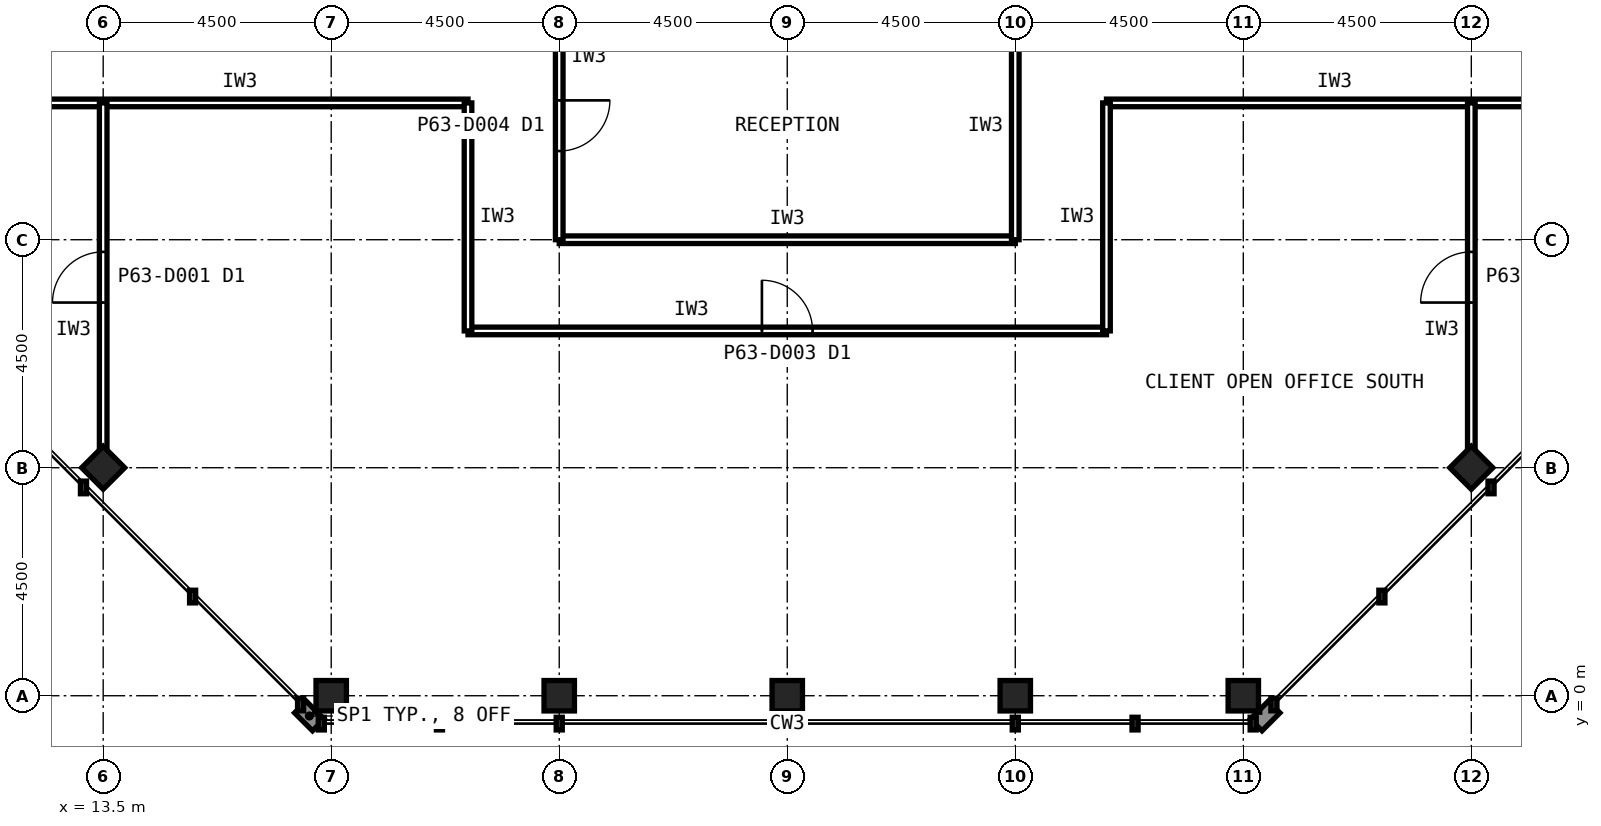
"""IFC4 building model, lengths in metres.
Left out: names, types, materials, properties, quantities, classifications, styles, units other than length and angle.
Written with IfcOpenShell. Run it as: python <this file> out.ifc"""

import sys

from ifc_helpers import new_model, si_unit, direction, frame, frame_2d, origin, origin_2d, place, context, subcontext, project, spatial, rectangle, hollow_rectangle, extrude, element, fill, save


model = new_model("IFC4")
c1 = context("Model", 3, precision=1e-05, world=origin(), true_north=direction((0.0, 1.0)))
c2 = subcontext(c1, "Body", "Model", "MODEL_VIEW")
j1 = project(units=[si_unit("LENGTHUNIT", "METRE"), si_unit("PLANEANGLEUNIT", "RADIAN")], contexts=[c1])
p1 = place(None, origin())
s1 = spatial("IfcSite", under=j1, at=p1, CompositionType="ELEMENT")
p2 = place(p1, origin())
s2 = spatial("IfcBuilding", under=s1, at=p2, CompositionType="ELEMENT")
p3 = place(p2, frame((0.0, 0.0, 262.6)))
s3 = spatial("IfcBuildingStorey", under=s2, at=p3, CompositionType="ELEMENT", Elevation=262.6)
for number, where, z_axis, x_axis in (
    (1, (18.0, 0.0, 0.0), (0.0, 0.0, 1.0), (1.0, 0.0, 0.0)),
    (2, (22.5, 0.0, 0.0), (0.0, 0.0, 1.0), (1.0, 0.0, 0.0)),
    (3, (27.0, 0.0, 0.0), (0.0, 0.0, 1.0), (1.0, 0.0, 0.0)),
    (4, (31.5, 0.0, 0.0), (0.0, 0.0, 1.0), (1.0, 0.0, 0.0)),
    (5, (36.0, 0.0, 0.0), (0.0, 0.0, 1.0), (1.0, 0.0, 0.0)),
    (6, (13.5, 4.5, 0.0), (0.0, 0.0, 1.0), (0.707, 0.707, 0.0)),
    (7, (40.5, 4.5, 0.0), (0.0, 0.0, 1.0), (0.707, 0.707, 0.0)),
):
    element("IfcColumn", number, at=place(p3, frame(where, z_axis=z_axis, x_axis=x_axis)), inside=s3, PredefinedType="COLUMN", context=c2, shape_type="SweptSolid", body=[
        extrude(hollow_rectangle(XDim=0.6, YDim=0.6, WallThickness=0.028, at=origin_2d()), origin(), (0.0, 0.0, 1.0), 4.0),
    ])
p4 = place(p3, frame((20.7, 7.2, 0.0), z_axis=(0.0, 0.0, 1.0), x_axis=(1.0, 0.0, 0.0)))
e8 = element("IfcWall", 8, at=p4, inside=s3, PredefinedType="PARTITIONING", context=c2, shape_type="SweptSolid", body=[
    extrude(rectangle(XDim=12.6, YDim=0.15, at=frame_2d((6.3, 0.0))), origin(), (0.0, 0.0, 1.0), 3.84),
])
p5 = place(p4, frame((5.8, 0.0, 0.0)))
e9 = element("IfcOpeningElement", 9, at=p5, cuts=e8, PredefinedType="OPENING", context=c2, shape_type="SweptSolid", body=[
    extrude(rectangle(XDim=1.0, YDim=2.1, at=frame_2d((0.5, 1.05))), frame((0.0, 0.085, 0.0), z_axis=(0.0, -1.0, 0.0), x_axis=(1.0, 0.0, 0.0)), (0.0, 0.0, 1.0), 0.17),
])
for number, where, z_axis, x_axis in (
    (10, (11.7, 11.7, 0.0), (0.0, 0.0, 1.0), (1.0, 0.0, 0.0)),
    (11, (33.3, 11.7, 0.0), (0.0, 0.0, 1.0), (1.0, 0.0, 0.0)),
):
    element("IfcWall", number, at=place(p3, frame(where, z_axis=z_axis, x_axis=x_axis)), inside=s3, PredefinedType="PARTITIONING", context=c2, shape_type="SweptSolid", body=[
        extrude(rectangle(XDim=9.0, YDim=0.15, at=frame_2d((4.5, 0.0))), origin(), (0.0, 0.0, 1.0), 3.84),
    ])
for number, where, z_axis, x_axis in (
    (12, (20.7, 11.7, 0.0), (0.0, 0.0, 1.0), (0.0, -1.0, 0.0)),
    (13, (33.3, 7.2, 0.0), (0.0, 0.0, 1.0), (0.0, 1.0, 0.0)),
):
    element("IfcWall", number, at=place(p3, frame(where, z_axis=z_axis, x_axis=x_axis)), inside=s3, PredefinedType="PARTITIONING", context=c2, shape_type="SweptSolid", body=[
        extrude(rectangle(XDim=4.5, YDim=0.15, at=frame_2d((2.25, 0.0))), origin(), (0.0, 0.0, 1.0), 3.84),
    ])
p6 = place(p3, frame((22.5, 9.0, 0.0), z_axis=(0.0, 0.0, 1.0), x_axis=(1.0, 0.0, 0.0)))
e14 = element("IfcWall", 14, at=p6, inside=s3, PredefinedType="PARTITIONING", context=c2, shape_type="SweptSolid", body=[
    extrude(rectangle(XDim=9.0, YDim=0.15, at=frame_2d((4.5, 0.0))), origin(), (0.0, 0.0, 1.0), 3.84),
])
p7 = place(p3, frame((31.5, 9.0, 0.0), z_axis=(0.0, 0.0, 1.0), x_axis=(0.0, 1.0, 0.0)))
e15 = element("IfcWall", 15, at=p7, inside=s3, PredefinedType="PARTITIONING", context=c2, shape_type="SweptSolid", body=[
    extrude(rectangle(XDim=4.5, YDim=0.15, at=frame_2d((2.25, 0.0))), origin(), (0.0, 0.0, 1.0), 2.989),
])
p8 = place(p3, frame((22.5, 13.5, 0.0), z_axis=(0.0, 0.0, 1.0), x_axis=(0.0, -1.0, 0.0)))
e16 = element("IfcWall", 16, at=p8, inside=s3, PredefinedType="PARTITIONING", context=c2, shape_type="SweptSolid", body=[
    extrude(rectangle(XDim=4.5, YDim=0.15, at=frame_2d((2.25, 0.0))), origin(), (0.0, 0.0, 1.0), 2.989),
])
p9 = place(p8, frame((1.75, 0.0, 0.0)))
e17 = element("IfcOpeningElement", 17, at=p9, cuts=e16, PredefinedType="OPENING", context=c2, shape_type="SweptSolid", body=[
    extrude(rectangle(XDim=1.0, YDim=2.1, at=frame_2d((0.5, 1.05))), frame((0.0, 0.085, 0.0), z_axis=(0.0, -1.0, 0.0), x_axis=(1.0, 0.0, 0.0)), (0.0, 0.0, 1.0), 0.17),
])
p10 = place(p3, frame((40.5, 4.82, 0.0), z_axis=(0.0, 0.0, 1.0), x_axis=(0.0, 1.0, 0.0)))
e18 = element("IfcWall", 18, at=p10, inside=s3, PredefinedType="PARTITIONING", context=c2, shape_type="SweptSolid", body=[
    extrude(rectangle(XDim=6.88, YDim=0.15, at=frame_2d((3.44, 0.0))), origin(), (0.0, 0.0, 1.0), 2.989),
])
p11 = place(p10, frame((2.94, 0.0, 0.0)))
e19 = element("IfcOpeningElement", 19, at=p11, cuts=e18, PredefinedType="OPENING", context=c2, shape_type="SweptSolid", body=[
    extrude(rectangle(XDim=1.0, YDim=2.1, at=frame_2d((0.5, 1.05))), frame((0.0, 0.085, 0.0), z_axis=(0.0, -1.0, 0.0), x_axis=(1.0, 0.0, 0.0)), (0.0, 0.0, 1.0), 0.17),
])
p12 = place(p3, frame((13.5, 4.82, 0.0), z_axis=(0.0, 0.0, 1.0), x_axis=(0.0, 1.0, 0.0)))
e20 = element("IfcWall", 20, at=p12, inside=s3, PredefinedType="PARTITIONING", context=c2, shape_type="SweptSolid", body=[
    extrude(rectangle(XDim=6.88, YDim=0.15, at=frame_2d((3.44, 0.0))), origin(), (0.0, 0.0, 1.0), 2.989),
])
p13 = place(p12, frame((2.94, 0.0, 0.0)))
e21 = element("IfcOpeningElement", 21, at=p13, cuts=e20, PredefinedType="OPENING", context=c2, shape_type="SweptSolid", body=[
    extrude(rectangle(XDim=1.0, YDim=2.1, at=frame_2d((0.5, 1.05))), frame((0.0, 0.085, 0.0), z_axis=(0.0, -1.0, 0.0), x_axis=(1.0, 0.0, 0.0)), (0.0, 0.0, 1.0), 0.17),
])
p14 = place(p5, origin())
e22 = element("IfcDoor", 22, at=p14, inside=s3, OperationType="SINGLE_SWING_LEFT", PredefinedType="DOOR", context=c2, shape_type="SweptSolid", body=[
    extrude(rectangle(XDim=1.0, YDim=2.1, at=frame_2d((0.5, 1.05))), frame((0.0, 0.025, 0.0), z_axis=(0.0, -1.0, 0.0), x_axis=(1.0, 0.0, 0.0)), (0.0, 0.0, 1.0), 0.05),
])
fill(e9, e22)
p15 = place(p9, origin())
e23 = element("IfcDoor", 23, at=p15, inside=s3, OperationType="SINGLE_SWING_LEFT", PredefinedType="DOOR", context=c2, shape_type="SweptSolid", body=[
    extrude(rectangle(XDim=1.0, YDim=2.1, at=frame_2d((0.5, 1.05))), frame((0.0, 0.025, 0.0), z_axis=(0.0, -1.0, 0.0), x_axis=(1.0, 0.0, 0.0)), (0.0, 0.0, 1.0), 0.05),
])
fill(e17, e23)
p16 = place(p11, origin())
e24 = element("IfcDoor", 24, at=p16, inside=s3, OperationType="SINGLE_SWING_LEFT", PredefinedType="DOOR", context=c2, shape_type="SweptSolid", body=[
    extrude(rectangle(XDim=1.0, YDim=2.1, at=frame_2d((0.5, 1.05))), frame((0.0, 0.025, 0.0), z_axis=(0.0, -1.0, 0.0), x_axis=(1.0, 0.0, 0.0)), (0.0, 0.0, 1.0), 0.05),
])
fill(e19, e24)
p17 = place(p13, origin())
e25 = element("IfcDoor", 25, at=p17, inside=s3, OperationType="SINGLE_SWING_LEFT", PredefinedType="DOOR", context=c2, shape_type="SweptSolid", body=[
    extrude(rectangle(XDim=1.0, YDim=2.1, at=frame_2d((0.5, 1.05))), frame((0.0, 0.025, 0.0), z_axis=(0.0, -1.0, 0.0), x_axis=(1.0, 0.0, 0.0)), (0.0, 0.0, 1.0), 0.05),
])
fill(e21, e25)
save(model, sys.argv[1])
